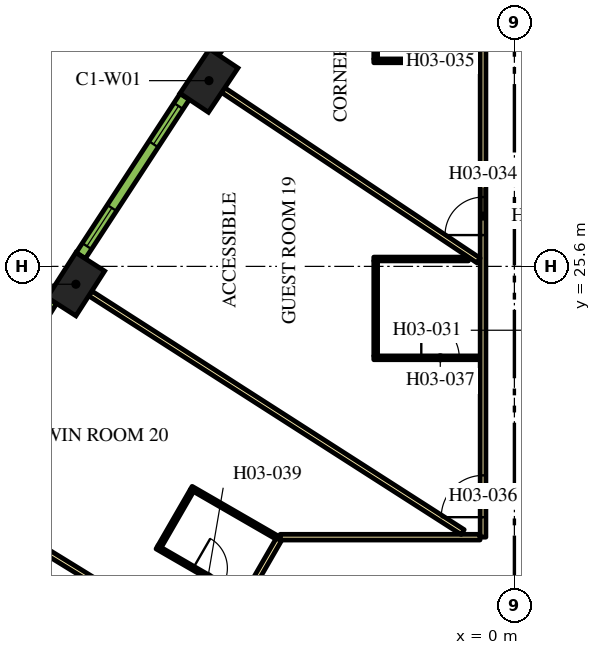
"""IFC4 building model, lengths in metres.
Left out: names, types, materials, properties, quantities, classifications, styles, units other than length and angle.
Written with IfcOpenShell. Run it as: python <this file> out.ifc"""

import sys

from ifc_helpers import new_model, si_unit, direction, frame, frame_2d, origin, origin_2d, place, context, subcontext, project, spatial, rectangle, extrude, element, fill, save


model = new_model("IFC4")
c1 = context("Model", 3, precision=1e-05, world=origin(), true_north=direction((0.0, 1.0)))
c2 = subcontext(c1, "Body", "Model", "MODEL_VIEW")
j1 = project(units=[si_unit("LENGTHUNIT", "METRE"), si_unit("PLANEANGLEUNIT", "RADIAN")], contexts=[c1])
p1 = place(None, origin())
s1 = spatial("IfcSite", under=j1, at=p1, CompositionType="ELEMENT")
p2 = place(p1, origin())
s2 = spatial("IfcBuilding", under=s1, at=p2, CompositionType="ELEMENT")
p3 = place(p2, frame((0.0, 0.0, 58.8)))
s3 = spatial("IfcBuildingStorey", under=s2, at=p3, CompositionType="ELEMENT", Elevation=58.8)
for number, where, z_axis, x_axis in (
    (1, (-8.037, 30.487, 0.0), (0.0, 0.0, 1.0), (-0.555, -0.832, 0.0)),
    (2, (-11.539, 25.131, 0.0), (0.0, 0.0, 1.0), (-0.539, -0.842, 0.0)),
):
    element("IfcColumn", number, at=place(p3, frame(where, z_axis=z_axis, x_axis=x_axis)), inside=s3, PredefinedType="COLUMN", context=c2, shape_type="SweptSolid", body=[
        extrude(rectangle(XDim=1.4, YDim=0.9, at=origin_2d()), origin(), (0.0, 0.0, 1.0), 3.9),
    ])
p4 = place(p3, frame((-0.825, 18.475, 0.0), z_axis=(0.0, 0.0, 1.0), x_axis=(0.0, 1.0, 0.0)))
e3 = element("IfcWall", 3, at=p4, inside=s3, PredefinedType="PARTITIONING", context=c2, shape_type="SweptSolid", body=[
    extrude(rectangle(XDim=16.224, YDim=0.15, at=frame_2d((8.112, 0.0))), origin(), (0.0, 0.0, 1.0), 2.75),
])
p5 = place(p4, frame((7.949, 0.0, 0.0)))
e4 = element("IfcOpeningElement", 4, at=p5, cuts=e3, PredefinedType="OPENING", context=c2, shape_type="SweptSolid", body=[
    extrude(rectangle(XDim=1.0, YDim=2.1, at=frame_2d((0.5, 1.05))), frame((0.0, 0.085, 0.0), z_axis=(0.0, -1.0, 0.0), x_axis=(1.0, 0.0, 0.0)), (0.0, 0.0, 1.0), 0.17),
])
p6 = place(p4, frame((0.526, 0.0, 0.0)))
e5 = element("IfcOpeningElement", 5, at=p6, cuts=e3, PredefinedType="OPENING", context=c2, shape_type="SweptSolid", body=[
    extrude(rectangle(XDim=1.1, YDim=2.1, at=frame_2d((0.55, 1.05))), frame((0.0, 0.085, 0.0), z_axis=(0.0, -1.0, 0.0), x_axis=(1.0, 0.0, 0.0)), (0.0, 0.0, 1.0), 0.17),
])
p7 = place(p3, frame((-6.163, 18.475, 0.0), z_axis=(0.0, 0.0, 1.0), x_axis=(1.0, 0.0, 0.0)))
e6 = element("IfcWall", 6, at=p7, inside=s3, PredefinedType="PARTITIONING", context=c2, shape_type="SweptSolid", body=[
    extrude(rectangle(XDim=5.258, YDim=0.15, at=frame_2d((2.629, 0.0))), origin(), (0.0, 0.0, 1.0), 2.75),
])
p8 = place(p3, frame((-19.081, -3.9, 0.0), z_axis=(0.0, 0.0, 1.0), x_axis=(0.499998313975, 0.866026377209, 0.0)))
e7 = element("IfcWall", 7, at=p8, inside=s3, PredefinedType="PARTITIONING", context=c2, shape_type="SweptSolid", body=[
    extrude(rectangle(XDim=25.766, YDim=0.15, at=frame_2d((12.883, 0.0))), origin(), (0.0, 0.0, 1.0), 2.75),
])
p9 = place(p8, frame((22.445, 0.0, 0.0)))
e8 = element("IfcOpeningElement", 8, at=p9, cuts=e7, PredefinedType="OPENING", context=c2, shape_type="SweptSolid", body=[
    extrude(rectangle(XDim=1.0, YDim=2.1, at=frame_2d((0.5, 1.05))), frame((0.0, 0.085, 0.0), z_axis=(0.0, -1.0, 0.0), x_axis=(1.0, 0.0, 0.0)), (0.0, 0.0, 1.0), 0.17),
])
p10 = place(p8, frame((21.138, 0.0, 0.0)))
e9 = element("IfcOpeningElement", 9, at=p10, cuts=e7, PredefinedType="OPENING", context=c2, shape_type="SweptSolid", body=[
    extrude(rectangle(XDim=1.0, YDim=2.1, at=frame_2d((0.5, 1.05))), frame((0.0, 0.085, 0.0), z_axis=(0.0, -1.0, 0.0), x_axis=(1.0, 0.0, 0.0)), (0.0, 0.0, 1.0), 0.17),
])
p11 = place(p8, frame((14.066, 0.0, 0.0)))
e10 = element("IfcOpeningElement", 10, at=p11, cuts=e7, PredefinedType="OPENING", context=c2, shape_type="SweptSolid", body=[
    extrude(rectangle(XDim=0.9, YDim=2.1, at=frame_2d((0.45, 1.05))), frame((0.0, 0.085, 0.0), z_axis=(0.0, -1.0, 0.0), x_axis=(1.0, 0.0, 0.0)), (0.0, 0.0, 1.0), 0.17),
])
p12 = place(p8, frame((11.693, 0.0, 0.0)))
e11 = element("IfcOpeningElement", 11, at=p12, cuts=e7, PredefinedType="OPENING", context=c2, shape_type="SweptSolid", body=[
    extrude(rectangle(XDim=1.0, YDim=2.1, at=frame_2d((0.5, 1.05))), frame((0.0, 0.085, 0.0), z_axis=(0.0, -1.0, 0.0), x_axis=(1.0, 0.0, 0.0)), (0.0, 0.0, 1.0), 0.17),
])
p13 = place(p3, frame((-14.558, 19.475, 0.0), z_axis=(0.0, 0.0, 1.0), x_axis=(0.851829455142, -0.523819223925, 0.0)))
e12 = element("IfcWall", 12, at=p13, inside=s3, PredefinedType="PARTITIONING", context=c2, shape_type="SweptSolid", body=[
    extrude(rectangle(XDim=7.688, YDim=0.15, at=frame_2d((3.844, 0.0))), origin(), (0.0, 0.0, 1.0), 2.75),
])
p14 = place(p3, frame((-11.16, 24.888, 0.0), z_axis=(0.0, 0.0, 1.0), x_axis=(0.84199813156, -0.539480441211, 0.0)))
e13 = element("IfcWall", 13, at=p14, inside=s3, PredefinedType="PARTITIONING", context=c2, shape_type="SweptSolid", body=[
    extrude(rectangle(XDim=11.638, YDim=0.15, at=frame_2d((5.819, 0.0))), origin(), (0.0, 0.0, 1.0), 2.75),
])
p15 = place(p3, frame((-7.662, 30.238, 0.0), z_axis=(0.0, 0.0, 1.0), x_axis=(0.831882886825, -0.554951225431, 0.0)))
e14 = element("IfcWall", 14, at=p15, inside=s3, PredefinedType="PARTITIONING", context=c2, shape_type="SweptSolid", body=[
    extrude(rectangle(XDim=8.079, YDim=0.15, at=frame_2d((4.04, 0.0))), origin(), (0.0, 0.0, 1.0), 2.75),
])
p16 = place(p3, frame((-3.7, 31.009, 0.0), z_axis=(0.0, 0.0, 1.0), x_axis=(1.0, 0.0, 0.0)))
e15 = element("IfcWall", 15, at=p16, inside=s3, PredefinedType="PARTITIONING", context=c2, shape_type="SweptSolid", body=[
    extrude(rectangle(XDim=2.8, YDim=0.1, at=frame_2d((1.4, 0.0))), origin(), (0.0, 0.0, 1.0), 2.75),
])
p17 = place(p16, frame((1.3, 0.0, 0.0)))
e16 = element("IfcOpeningElement", 16, at=p17, cuts=e15, PredefinedType="OPENING", context=c2, shape_type="SweptSolid", body=[
    extrude(rectangle(XDim=0.9, YDim=2.1, at=frame_2d((0.45, 1.05))), frame((0.0, 0.06, 0.0), z_axis=(0.0, -1.0, 0.0), x_axis=(1.0, 0.0, 0.0)), (0.0, 0.0, 1.0), 0.12),
])
p18 = place(p3, frame((-3.65, 31.059, 0.0), z_axis=(0.0, 0.0, 1.0), x_axis=(0.0, 1.0, 0.0)))
e17 = element("IfcWall", 17, at=p18, inside=s3, PredefinedType="PARTITIONING", context=c2, shape_type="SweptSolid", body=[
    extrude(rectangle(XDim=2.4, YDim=0.1, at=frame_2d((1.2, 0.0))), origin(), (0.0, 0.0, 1.0), 2.75),
])
p19 = place(p3, frame((-3.7, 23.195, 0.0), z_axis=(0.0, 0.0, 1.0), x_axis=(1.0, 0.0, 0.0)))
e18 = element("IfcWall", 18, at=p19, inside=s3, PredefinedType="PARTITIONING", context=c2, shape_type="SweptSolid", body=[
    extrude(rectangle(XDim=2.8, YDim=0.1, at=frame_2d((1.4, 0.0))), origin(), (0.0, 0.0, 1.0), 2.75),
])
p20 = place(p19, frame((1.25, 0.0, 0.0)))
e19 = element("IfcOpeningElement", 19, at=p20, cuts=e18, PredefinedType="OPENING", context=c2, shape_type="SweptSolid", body=[
    extrude(rectangle(XDim=1.0, YDim=2.1, at=frame_2d((0.5, 1.05))), frame((0.0, 0.06, 0.0), z_axis=(0.0, -1.0, 0.0), x_axis=(1.0, 0.0, 0.0)), (0.0, 0.0, 1.0), 0.12),
])
p21 = place(p3, frame((-3.65, 23.245, 0.0), z_axis=(0.0, 0.0, 1.0), x_axis=(0.0, 1.0, 0.0)))
e20 = element("IfcWall", 20, at=p21, inside=s3, PredefinedType="PARTITIONING", context=c2, shape_type="SweptSolid", body=[
    extrude(rectangle(XDim=2.5, YDim=0.1, at=frame_2d((1.25, 0.0))), origin(), (0.0, 0.0, 1.0), 2.75),
])
p22 = place(p3, frame((-1.21, 25.795, 0.0), z_axis=(0.0, 0.0, 1.0), x_axis=(-1.0, 0.0, 0.0)))
e21 = element("IfcWall", 21, at=p22, inside=s3, PredefinedType="PARTITIONING", context=c2, shape_type="SweptSolid", body=[
    extrude(rectangle(XDim=2.49, YDim=0.1, at=frame_2d((1.245, 0.0))), origin(), (0.0, 0.0, 1.0), 2.75),
])
p23 = place(p3, frame((-9.405, 18.21, 0.0), z_axis=(0.0, 0.0, 1.0), x_axis=(0.865997922154, -0.500047596559, 0.0)))
e22 = element("IfcWall", 22, at=p23, inside=s3, PredefinedType="PARTITIONING", context=c2, shape_type="SweptSolid", body=[
    extrude(rectangle(XDim=2.6, YDim=0.1, at=frame_2d((1.3, 0.0))), origin(), (0.0, 0.0, 1.0), 2.75),
])
p24 = place(p23, frame((1.1, 0.0, 0.0)))
e23 = element("IfcOpeningElement", 23, at=p24, cuts=e22, PredefinedType="OPENING", context=c2, shape_type="SweptSolid", body=[
    extrude(rectangle(XDim=0.9, YDim=2.1, at=frame_2d((0.45, 1.05))), frame((0.0, 0.06, 0.0), z_axis=(0.0, -1.0, 0.0), x_axis=(1.0, 0.0, 0.0)), (0.0, 0.0, 1.0), 0.12),
])
p25 = place(p3, frame((-9.336, 18.229, 0.0), z_axis=(0.0, 0.0, 1.0), x_axis=(0.499954529098, 0.86605165483, 0.0)))
e24 = element("IfcWall", 24, at=p25, inside=s3, PredefinedType="PARTITIONING", context=c2, shape_type="SweptSolid", body=[
    extrude(rectangle(XDim=1.7, YDim=0.1, at=frame_2d((0.85, 0.0))), origin(), (0.0, 0.0, 1.0), 2.75),
])
p26 = place(p3, frame((-6.253, 18.469, 0.0), z_axis=(0.0, 0.0, 1.0), x_axis=(-0.866021400173, 0.500006934395, 0.0)))
e25 = element("IfcWall", 25, at=p26, inside=s3, PredefinedType="PARTITIONING", context=c2, shape_type="SweptSolid", body=[
    extrude(rectangle(XDim=2.6, YDim=0.1, at=frame_2d((1.3, 0.0))), origin(), (0.0, 0.0, 1.0), 2.75),
])
p27 = place(p3, frame((-5.078, 35.376, 0.0), z_axis=(0.0, 0.0, 1.0), x_axis=(-0.562610153679, -0.826722332454, 0.0)))
e26 = element("IfcWall", 26, at=p27, inside=s3, PredefinedType="SOLIDWALL", context=c2, shape_type="SweptSolid", body=[
    extrude(rectangle(XDim=5.006, YDim=0.29, at=frame_2d((2.503, 0.0))), origin(), (0.0, 0.0, 1.0), 3.65),
])
p28 = place(p27, frame((0.265, 0.0, 0.9)))
e27 = element("IfcOpeningElement", 27, at=p28, cuts=e26, PredefinedType="OPENING", context=c2, shape_type="SweptSolid", body=[
    extrude(rectangle(XDim=1.2, YDim=2.15, at=frame_2d((0.6, 1.075))), frame((0.0, 0.155, 0.0), z_axis=(0.0, -1.0, 0.0), x_axis=(1.0, 0.0, 0.0)), (0.0, 0.0, 1.0), 0.31),
])
p29 = place(p27, frame((3.495, 0.0, 0.9)))
e28 = element("IfcOpeningElement", 28, at=p29, cuts=e26, PredefinedType="OPENING", context=c2, shape_type="SweptSolid", body=[
    extrude(rectangle(XDim=1.2, YDim=2.15, at=frame_2d((0.6, 1.075))), frame((0.0, 0.155, 0.0), z_axis=(0.0, -1.0, 0.0), x_axis=(1.0, 0.0, 0.0)), (0.0, 0.0, 1.0), 0.31),
])
p30 = place(p3, frame((-8.676, 30.068, 0.0), z_axis=(0.0, 0.0, 1.0), x_axis=(-0.547204617628, -0.836998868845, 0.0)))
e29 = element("IfcWall", 29, at=p30, inside=s3, PredefinedType="SOLIDWALL", context=c2, shape_type="SweptSolid", body=[
    extrude(rectangle(XDim=4.998, YDim=0.29, at=frame_2d((2.499, 0.0))), origin(), (0.0, 0.0, 1.0), 3.65),
])
p31 = place(p30, frame((0.297, 0.0, 0.9)))
e30 = element("IfcOpeningElement", 30, at=p31, cuts=e29, PredefinedType="OPENING", context=c2, shape_type="SweptSolid", body=[
    extrude(rectangle(XDim=1.2, YDim=2.15, at=frame_2d((0.6, 1.075))), frame((0.0, 0.155, 0.0), z_axis=(0.0, -1.0, 0.0), x_axis=(1.0, 0.0, 0.0)), (0.0, 0.0, 1.0), 0.31),
])
p32 = place(p30, frame((3.501, 0.0, 0.9)))
e31 = element("IfcOpeningElement", 31, at=p32, cuts=e29, PredefinedType="OPENING", context=c2, shape_type="SweptSolid", body=[
    extrude(rectangle(XDim=1.2, YDim=2.15, at=frame_2d((0.6, 1.075))), frame((0.0, 0.155, 0.0), z_axis=(0.0, -1.0, 0.0), x_axis=(1.0, 0.0, 0.0)), (0.0, 0.0, 1.0), 0.31),
])
p33 = place(p3, frame((-12.17, 24.699, 0.0), z_axis=(0.0, 0.0, 1.0), x_axis=(-0.531688286542, -0.846940119462, 0.0)))
e32 = element("IfcWall", 32, at=p33, inside=s3, PredefinedType="SOLIDWALL", context=c2, shape_type="SweptSolid", body=[
    extrude(rectangle(XDim=4.998, YDim=0.29, at=frame_2d((2.499, 0.0))), origin(), (0.0, 0.0, 1.0), 3.65),
])
p34 = place(p33, frame((0.297, 0.0, 0.9)))
e33 = element("IfcOpeningElement", 33, at=p34, cuts=e32, PredefinedType="OPENING", context=c2, shape_type="SweptSolid", body=[
    extrude(rectangle(XDim=1.2, YDim=2.15, at=frame_2d((0.6, 1.075))), frame((0.0, 0.155, 0.0), z_axis=(0.0, -1.0, 0.0), x_axis=(1.0, 0.0, 0.0)), (0.0, 0.0, 1.0), 0.31),
])
p35 = place(p33, frame((3.501, 0.0, 0.9)))
e34 = element("IfcOpeningElement", 34, at=p35, cuts=e32, PredefinedType="OPENING", context=c2, shape_type="SweptSolid", body=[
    extrude(rectangle(XDim=1.2, YDim=2.15, at=frame_2d((0.6, 1.075))), frame((0.0, 0.155, 0.0), z_axis=(0.0, -1.0, 0.0), x_axis=(1.0, 0.0, 0.0)), (0.0, 0.0, 1.0), 0.31),
])
p36 = place(p5, origin())
e35 = element("IfcDoor", 35, at=p36, inside=s3, OperationType="SINGLE_SWING_LEFT", PredefinedType="DOOR", context=c2, shape_type="SweptSolid", body=[
    extrude(rectangle(XDim=1.0, YDim=2.1, at=frame_2d((0.5, 1.05))), frame((0.0, 0.025, 0.0), z_axis=(0.0, -1.0, 0.0), x_axis=(1.0, 0.0, 0.0)), (0.0, 0.0, 1.0), 0.05),
])
fill(e4, e35)
p37 = place(p17, origin())
e36 = element("IfcDoor", 36, at=p37, inside=s3, OperationType="SINGLE_SWING_RIGHT", PredefinedType="DOOR", context=c2, shape_type="SweptSolid", body=[
    extrude(rectangle(XDim=0.9, YDim=2.1, at=frame_2d((0.45, 1.05))), frame((0.0, 0.025, 0.0), z_axis=(0.0, -1.0, 0.0), x_axis=(1.0, 0.0, 0.0)), (0.0, 0.0, 1.0), 0.05),
])
fill(e16, e36)
p38 = place(p6, origin())
e37 = element("IfcDoor", 37, at=p38, inside=s3, OperationType="SINGLE_SWING_LEFT", PredefinedType="DOOR", context=c2, shape_type="SweptSolid", body=[
    extrude(rectangle(XDim=1.1, YDim=2.1, at=frame_2d((0.55, 1.05))), frame((0.0, 0.025, 0.0), z_axis=(0.0, -1.0, 0.0), x_axis=(1.0, 0.0, 0.0)), (0.0, 0.0, 1.0), 0.05),
])
fill(e5, e37)
p39 = place(p20, origin())
e38 = element("IfcDoor", 38, at=p39, inside=s3, OperationType="SINGLE_SWING_LEFT", PredefinedType="DOOR", context=c2, shape_type="SweptSolid", body=[
    extrude(rectangle(XDim=1.0, YDim=2.1, at=frame_2d((0.5, 1.05))), frame((0.0, 0.025, 0.0), z_axis=(0.0, -1.0, 0.0), x_axis=(1.0, 0.0, 0.0)), (0.0, 0.0, 1.0), 0.05),
])
fill(e19, e38)
p40 = place(p24, origin())
e39 = element("IfcDoor", 39, at=p40, inside=s3, OperationType="SINGLE_SWING_LEFT", PredefinedType="DOOR", context=c2, shape_type="SweptSolid", body=[
    extrude(rectangle(XDim=0.9, YDim=2.1, at=frame_2d((0.45, 1.05))), frame((0.0, 0.025, 0.0), z_axis=(0.0, -1.0, 0.0), x_axis=(1.0, 0.0, 0.0)), (0.0, 0.0, 1.0), 0.05),
])
fill(e23, e39)
p41 = place(p31, origin())
e40 = element("IfcWindow", 40, at=p41, inside=s3, PartitioningType="DOUBLE_PANEL_VERTICAL", PredefinedType="WINDOW", context=c2, shape_type="SweptSolid", body=[
    extrude(rectangle(XDim=1.2, YDim=2.15, at=frame_2d((0.6, 1.075))), frame((0.0, 0.015, 0.0), z_axis=(0.0, -1.0, 0.0), x_axis=(1.0, 0.0, 0.0)), (0.0, 0.0, 1.0), 0.06),
])
fill(e30, e40)
p42 = place(p32, origin())
e41 = element("IfcWindow", 41, at=p42, inside=s3, PartitioningType="DOUBLE_PANEL_VERTICAL", PredefinedType="WINDOW", context=c2, shape_type="SweptSolid", body=[
    extrude(rectangle(XDim=1.2, YDim=2.15, at=frame_2d((0.6, 1.075))), frame((0.0, 0.015, 0.0), z_axis=(0.0, -1.0, 0.0), x_axis=(1.0, 0.0, 0.0)), (0.0, 0.0, 1.0), 0.06),
])
fill(e31, e41)
save(model, sys.argv[1])
